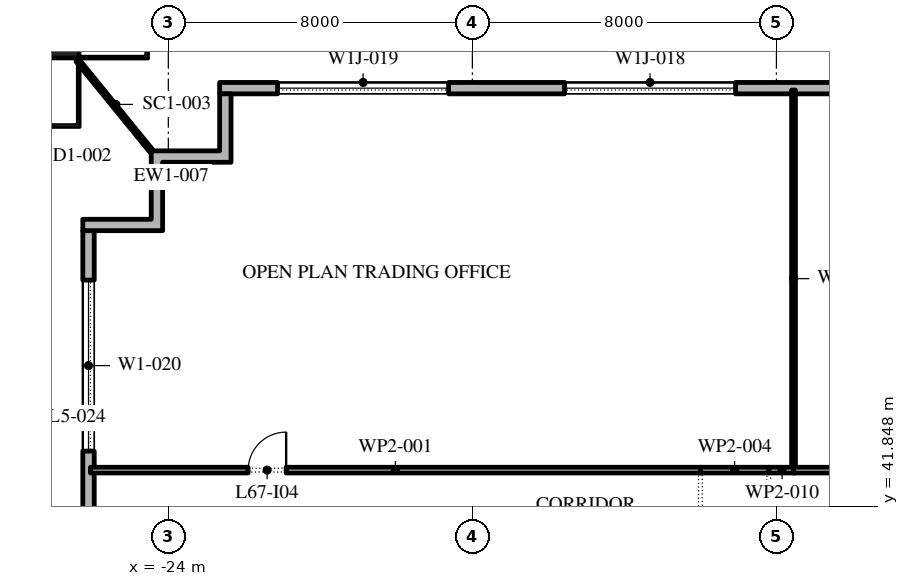
"""IFC4 building model, lengths in metres.
Left out: names, types, materials, properties, quantities, classifications, styles, units other than length and angle.
Written with IfcOpenShell. Run it as: python <this file> out.ifc"""

import sys

from ifc_helpers import new_model, si_unit, direction, frame, frame_2d, origin, origin_2d, place, context, subcontext, project, spatial, polyline, rectangle, outline, extrude, element, fill, save


model = new_model("IFC4")
c1 = context("Model", 3, precision=1e-05, world=origin(), true_north=direction((0.0, 1.0)))
c2 = subcontext(c1, "Body", "Model", "MODEL_VIEW")
j1 = project(units=[si_unit("LENGTHUNIT", "METRE"), si_unit("PLANEANGLEUNIT", "RADIAN")], contexts=[c1])
p1 = place(None, origin())
s1 = spatial("IfcSite", under=j1, at=p1, CompositionType="ELEMENT")
p2 = place(p1, origin())
s2 = spatial("IfcBuilding", under=s1, at=p2, CompositionType="ELEMENT")
p3 = place(p2, frame((0.0, 0.0, 309.0)))
s3 = spatial("IfcBuildingStorey", under=s2, at=p3, CompositionType="ELEMENT", Elevation=309.0)
p4 = place(p3, frame((-26.85, 54.146, 0.0), z_axis=(0.0, 0.090540965689, 0.995892731941), x_axis=(-1.0, 0.0, 0.0)))
e1 = element("IfcColumn", 1, at=p4, inside=s3, PredefinedType="COLUMN", context=c2, shape_type="SweptSolid", body=[
    extrude(rectangle(XDim=1.0, YDim=1.0, at=origin_2d()), origin(), (0.0, 0.0, 1.0), 4.217),
])
p5 = place(p3, frame((22.35, 52.85, 0.0), z_axis=(0.0, 0.0, 1.0), x_axis=(-1.0, 0.0, 0.0)))
e2 = element("IfcWall", 2, at=p5, inside=s3, PredefinedType="STANDARD", context=c2, shape_type="SweptSolid", body=[
    extrude(rectangle(XDim=45.0, YDim=0.3, at=frame_2d((22.5, 0.0))), origin(), (0.0, 0.0, 1.0), 4.0),
])
p6 = place(p5, frame((1.375, 0.0, 0.45)))
e3 = element("IfcOpeningElement", 3, at=p6, cuts=e2, PredefinedType="OPENING", context=c2, shape_type="SweptSolid", body=[
    extrude(rectangle(XDim=4.5, YDim=2.675, at=frame_2d((2.25, 1.337))), frame((0.0, 0.16, 0.0), z_axis=(0.0, -1.0, 0.0), x_axis=(1.0, 0.0, 0.0)), (0.0, 0.0, 1.0), 0.32),
])
p7 = place(p5, frame((8.775, 0.0, 0.45)))
e4 = element("IfcOpeningElement", 4, at=p7, cuts=e2, PredefinedType="OPENING", context=c2, shape_type="SweptSolid", body=[
    extrude(rectangle(XDim=4.5, YDim=2.675, at=frame_2d((2.25, 1.337))), frame((0.0, 0.16, 0.0), z_axis=(0.0, -1.0, 0.0), x_axis=(1.0, 0.0, 0.0)), (0.0, 0.0, 1.0), 0.32),
])
p8 = place(p5, frame((17.375, 0.0, 0.0)))
e5 = element("IfcOpeningElement", 5, at=p8, cuts=e2, PredefinedType="OPENING", context=c2, shape_type="SweptSolid", body=[
    extrude(rectangle(XDim=2.4, YDim=3.125, at=frame_2d((1.2, 1.562))), frame((0.0, 0.16, 0.0), z_axis=(0.0, -1.0, 0.0), x_axis=(1.0, 0.0, 0.0)), (0.0, 0.0, 1.0), 0.32),
])
p9 = place(p5, frame((23.875, 0.0, 0.45)))
e6 = element("IfcOpeningElement", 6, at=p9, cuts=e2, PredefinedType="OPENING", context=c2, shape_type="SweptSolid", body=[
    extrude(rectangle(XDim=4.5, YDim=2.675, at=frame_2d((2.25, 1.337))), frame((0.0, 0.16, 0.0), z_axis=(0.0, -1.0, 0.0), x_axis=(1.0, 0.0, 0.0)), (0.0, 0.0, 1.0), 0.32),
])
p10 = place(p5, frame((31.425, 0.0, 0.45)))
e7 = element("IfcOpeningElement", 7, at=p10, cuts=e2, PredefinedType="OPENING", context=c2, shape_type="SweptSolid", body=[
    extrude(rectangle(XDim=4.5, YDim=2.675, at=frame_2d((2.25, 1.337))), frame((0.0, 0.16, 0.0), z_axis=(0.0, -1.0, 0.0), x_axis=(1.0, 0.0, 0.0)), (0.0, 0.0, 1.0), 0.32),
])
p11 = place(p5, frame((38.975, 0.0, 0.45)))
e8 = element("IfcOpeningElement", 8, at=p11, cuts=e2, PredefinedType="OPENING", context=c2, shape_type="SweptSolid", body=[
    extrude(rectangle(XDim=4.5, YDim=2.675, at=frame_2d((2.25, 1.337))), frame((0.0, 0.16, 0.0), z_axis=(0.0, -1.0, 0.0), x_axis=(1.0, 0.0, 0.0)), (0.0, 0.0, 1.0), 0.32),
])
p12 = place(p3, frame((-26.1, 49.1, 0.0), z_axis=(0.0, 0.0, 1.0), x_axis=(0.0, -1.0, 0.0)))
e9 = element("IfcWall", 9, at=p12, inside=s3, PredefinedType="STANDARD", context=c2, shape_type="SweptSolid", body=[
    extrude(rectangle(XDim=51.5, YDim=0.3, at=frame_2d((25.75, 0.0))), origin(), (0.0, 0.0, 1.0), 4.0),
])
p13 = place(p12, frame((1.3, 0.0, 0.45)))
e10 = element("IfcOpeningElement", 10, at=p13, cuts=e9, PredefinedType="OPENING", context=c2, shape_type="SweptSolid", body=[
    extrude(rectangle(XDim=4.5, YDim=3.05, at=frame_2d((2.25, 1.525))), frame((0.0, 0.16, 0.0), z_axis=(0.0, -1.0, 0.0), x_axis=(1.0, 0.0, 0.0)), (0.0, 0.0, 1.0), 0.32),
])
p14 = place(p12, frame((8.55, 0.0, 0.45)))
e11 = element("IfcOpeningElement", 11, at=p14, cuts=e9, PredefinedType="OPENING", context=c2, shape_type="SweptSolid", body=[
    extrude(rectangle(XDim=4.5, YDim=3.05, at=frame_2d((2.25, 1.525))), frame((0.0, 0.16, 0.0), z_axis=(0.0, -1.0, 0.0), x_axis=(1.0, 0.0, 0.0)), (0.0, 0.0, 1.0), 0.32),
])
p15 = place(p12, frame((17.0, 0.0, 0.0)))
e12 = element("IfcOpeningElement", 12, at=p15, cuts=e9, PredefinedType="OPENING", context=c2, shape_type="SweptSolid", body=[
    extrude(rectangle(XDim=2.4, YDim=3.5, at=frame_2d((1.2, 1.75))), frame((0.0, 0.16, 0.0), z_axis=(0.0, -1.0, 0.0), x_axis=(1.0, 0.0, 0.0)), (0.0, 0.0, 1.0), 0.32),
])
p16 = place(p12, frame((23.35, 0.0, 0.45)))
e13 = element("IfcOpeningElement", 13, at=p16, cuts=e9, PredefinedType="OPENING", context=c2, shape_type="SweptSolid", body=[
    extrude(rectangle(XDim=4.5, YDim=3.05, at=frame_2d((2.25, 1.525))), frame((0.0, 0.16, 0.0), z_axis=(0.0, -1.0, 0.0), x_axis=(1.0, 0.0, 0.0)), (0.0, 0.0, 1.0), 0.32),
])
p17 = place(p12, frame((30.75, 0.0, 0.45)))
e14 = element("IfcOpeningElement", 14, at=p17, cuts=e9, PredefinedType="OPENING", context=c2, shape_type="SweptSolid", body=[
    extrude(rectangle(XDim=4.5, YDim=3.05, at=frame_2d((2.25, 1.525))), frame((0.0, 0.16, 0.0), z_axis=(0.0, -1.0, 0.0), x_axis=(1.0, 0.0, 0.0)), (0.0, 0.0, 1.0), 0.32),
])
p18 = place(p12, frame((38.15, 0.0, 0.45)))
e15 = element("IfcOpeningElement", 15, at=p18, cuts=e9, PredefinedType="OPENING", context=c2, shape_type="SweptSolid", body=[
    extrude(rectangle(XDim=4.5, YDim=3.05, at=frame_2d((2.25, 1.525))), frame((0.0, 0.16, 0.0), z_axis=(0.0, -1.0, 0.0), x_axis=(1.0, 0.0, 0.0)), (0.0, 0.0, 1.0), 0.32),
])
p19 = place(p12, frame((46.6, 0.0, 0.0)))
e16 = element("IfcOpeningElement", 16, at=p19, cuts=e9, PredefinedType="OPENING", context=c2, shape_type="SweptSolid", body=[
    extrude(rectangle(XDim=2.4, YDim=3.5, at=frame_2d((1.2, 1.75))), frame((0.0, 0.16, 0.0), z_axis=(0.0, -1.0, 0.0), x_axis=(1.0, 0.0, 0.0)), (0.0, 0.0, 1.0), 0.32),
])
p20 = place(p3, origin())
e17 = element("IfcWall", 17, at=p20, inside=s3, PredefinedType="STANDARD", context=c2, shape_type="SweptSolid", body=[
    extrude(outline(polyline([(-24.45, 49.4), (-24.45, 51.2), (-22.65, 51.2), (-22.65, 52.7), (-22.35, 52.7), (-22.35, 50.9), (-24.15, 50.9), (-24.15, 49.1), (-26.25, 49.1), (-26.25, 49.4), (-24.45, 49.4)])), origin(), (0.0, 0.0, 1.0), 4.0),
])
p21 = place(p3, frame((-24.45, 51.2, -0.05), z_axis=(0.0, 0.0, 1.0), x_axis=(-0.631657032083, 0.775247956347, 0.0)))
e18 = element("IfcWall", 18, at=p21, inside=s3, PredefinedType="STANDARD", context=c2, shape_type="SweptSolid", body=[
    extrude(rectangle(XDim=3.072, YDim=0.1, at=frame_2d((1.536, 0.0))), origin(), (0.0, 0.0, 1.0), 4.05),
])
p22 = place(p3, frame((-26.05, 42.8, 0.0), z_axis=(0.0, 0.0, 1.0), x_axis=(1.0, 0.0, 0.0)))
e19 = element("IfcWall", 19, at=p22, inside=s3, PredefinedType="PARTITIONING", context=c2, shape_type="SweptSolid", body=[
    extrude(rectangle(XDim=16.05, YDim=0.15, at=frame_2d((8.025, 0.0))), origin(), (0.0, 0.0, 1.0), 4.0),
])
p23 = place(p22, frame((4.15, 0.0, 0.0)))
e20 = element("IfcOpeningElement", 20, at=p23, cuts=e19, PredefinedType="OPENING", context=c2, shape_type="SweptSolid", body=[
    extrude(rectangle(XDim=1.0, YDim=2.1, at=frame_2d((0.5, 1.05))), frame((0.0, 0.085, 0.0), z_axis=(0.0, -1.0, 0.0), x_axis=(1.0, 0.0, 0.0)), (0.0, 0.0, 1.0), 0.17),
])
p24 = place(p3, frame((-10.0, 42.8, 0.0), z_axis=(0.0, 0.0, 1.0), x_axis=(1.0, 0.0, 0.0)))
e21 = element("IfcWall", 21, at=p24, inside=s3, PredefinedType="PARTITIONING", context=c2, shape_type="SweptSolid", body=[
    extrude(rectangle(XDim=1.8, YDim=0.15, at=frame_2d((0.9, 0.0))), origin(), (0.0, 0.0, 1.0), 4.0),
])
p25 = place(p3, frame((-8.2, 42.8, 0.0), z_axis=(0.0, 0.0, 1.0), x_axis=(1.0, 0.0, 0.0)))
e22 = element("IfcWall", 22, at=p25, inside=s3, PredefinedType="PARTITIONING", context=c2, shape_type="SweptSolid", body=[
    extrude(rectangle(XDim=0.7, YDim=0.15, at=frame_2d((0.35, 0.0))), origin(), (0.0, 0.0, 1.0), 4.0),
])
p26 = place(p3, frame((-7.55, 42.875, 0.0), z_axis=(0.0, 0.0, 1.0), x_axis=(0.0, 1.0, 0.0)))
e23 = element("IfcWall", 23, at=p26, inside=s3, PredefinedType="PARTITIONING", context=c2, shape_type="SweptSolid", body=[
    extrude(rectangle(XDim=9.925, YDim=0.1, at=frame_2d((4.962, 0.0))), origin(), (0.0, 0.0, 1.0), 4.0),
])
p27 = place(p3, frame((-7.55, 42.8, 0.0), z_axis=(0.0, 0.0, 1.0), x_axis=(1.0, 0.0, 0.0)))
e24 = element("IfcWall", 24, at=p27, inside=s3, PredefinedType="PARTITIONING", context=c2, shape_type="SweptSolid", body=[
    extrude(rectangle(XDim=15.15, YDim=0.15, at=frame_2d((7.575, 0.0))), origin(), (0.0, 0.0, 1.0), 4.0),
])
p28 = place(p27, frame((3.95, 0.0, 0.0)))
e25 = element("IfcOpeningElement", 25, at=p28, cuts=e24, PredefinedType="OPENING", context=c2, shape_type="SweptSolid", body=[
    extrude(rectangle(XDim=1.0, YDim=2.1, at=frame_2d((0.5, 1.05))), frame((0.0, 0.085, 0.0), z_axis=(0.0, -1.0, 0.0), x_axis=(1.0, 0.0, 0.0)), (0.0, 0.0, 1.0), 0.17),
])
p29 = place(p10, origin())
e26 = element("IfcWindow", 26, at=p29, inside=s3, PartitioningType="DOUBLE_PANEL_VERTICAL", PredefinedType="WINDOW", context=c2, shape_type="SweptSolid", body=[
    extrude(rectangle(XDim=4.5, YDim=2.675, at=frame_2d((2.25, 1.337))), frame((0.0, 0.03, 0.0), z_axis=(0.0, -1.0, 0.0), x_axis=(1.0, 0.0, 0.0)), (0.0, 0.0, 1.0), 0.06),
])
fill(e7, e26)
p30 = place(p11, origin())
e27 = element("IfcWindow", 27, at=p30, inside=s3, PartitioningType="DOUBLE_PANEL_VERTICAL", PredefinedType="WINDOW", context=c2, shape_type="SweptSolid", body=[
    extrude(rectangle(XDim=4.5, YDim=2.675, at=frame_2d((2.25, 1.337))), frame((0.0, 0.03, 0.0), z_axis=(0.0, -1.0, 0.0), x_axis=(1.0, 0.0, 0.0)), (0.0, 0.0, 1.0), 0.06),
])
fill(e8, e27)
p31 = place(p13, origin())
e28 = element("IfcWindow", 28, at=p31, inside=s3, PartitioningType="DOUBLE_PANEL_VERTICAL", PredefinedType="WINDOW", context=c2, shape_type="SweptSolid", body=[
    extrude(rectangle(XDim=4.5, YDim=3.05, at=frame_2d((2.25, 1.525))), frame((0.0, 0.03, 0.0), z_axis=(0.0, -1.0, 0.0), x_axis=(1.0, 0.0, 0.0)), (0.0, 0.0, 1.0), 0.06),
])
fill(e10, e28)
p32 = place(p23, origin())
e29 = element("IfcDoor", 29, at=p32, inside=s3, OperationType="SINGLE_SWING_LEFT", PredefinedType="DOOR", context=c2, shape_type="SweptSolid", body=[
    extrude(rectangle(XDim=1.0, YDim=2.1, at=frame_2d((0.5, 1.05))), frame((0.0, 0.025, 0.0), z_axis=(0.0, -1.0, 0.0), x_axis=(1.0, 0.0, 0.0)), (0.0, 0.0, 1.0), 0.05),
])
fill(e20, e29)
save(model, sys.argv[1])
